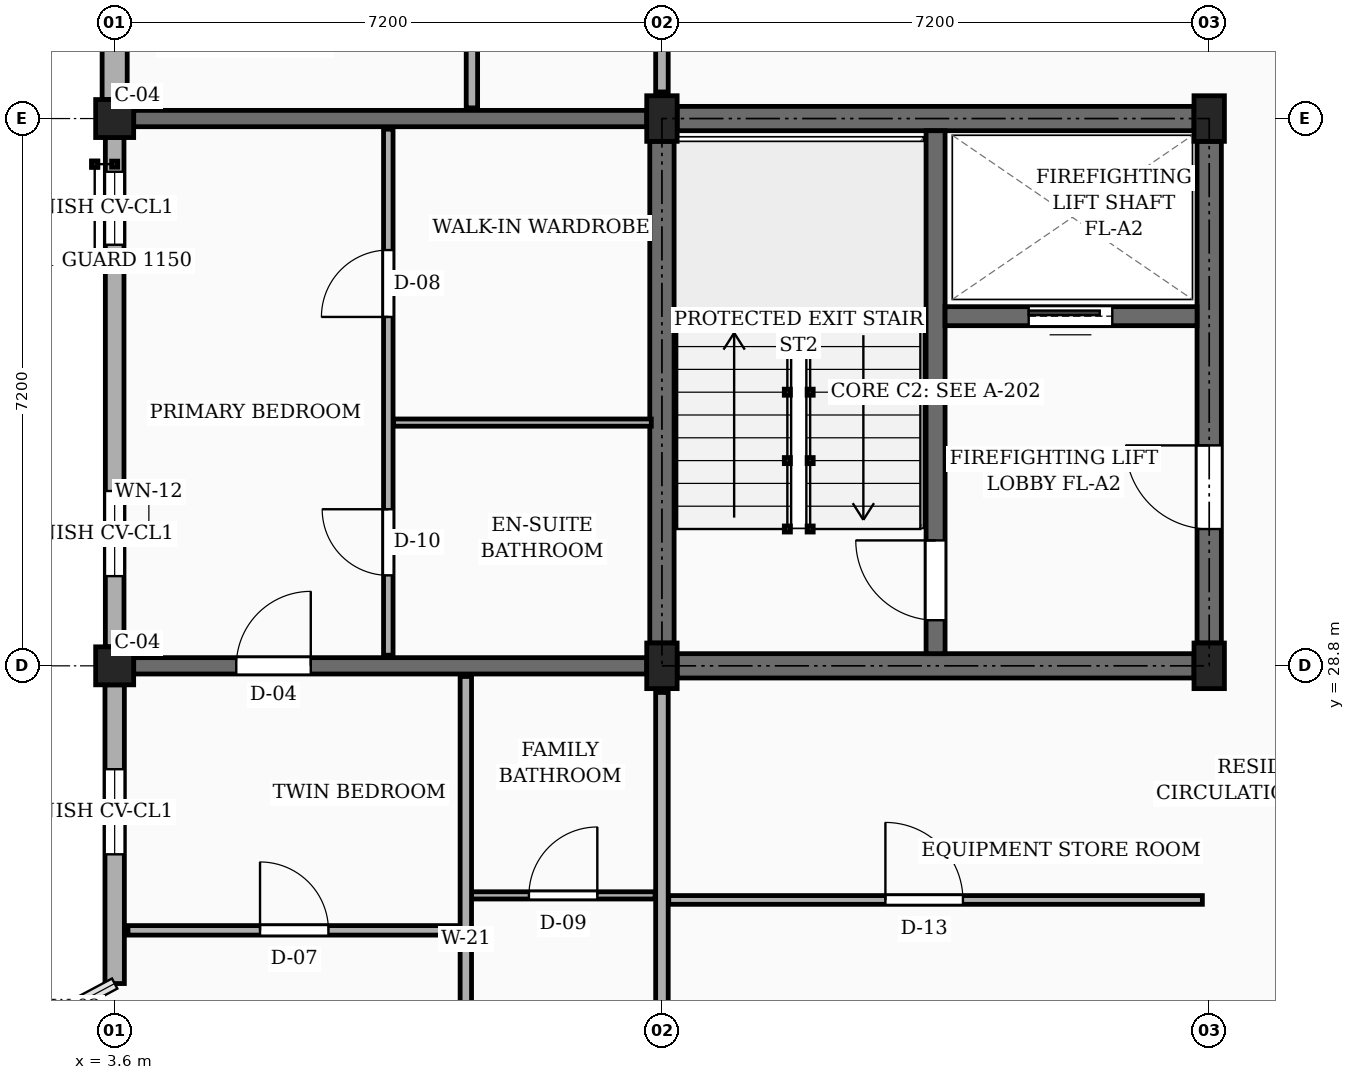
"""IFC4 building model, lengths in metres.
Left out: names, types, materials, properties, quantities, classifications, styles, units other than length and angle.
Written with IfcOpenShell. Run it as: python <this file> out.ifc"""

import sys

from ifc_helpers import new_model, si_unit, direction, frame, frame_2d, origin, origin_2d, place, context, subcontext, project, spatial, rectangle, extrude, element, fill, save


model = new_model("IFC4")
c1 = context("Model", 3, precision=1e-05, world=origin(), true_north=direction((0.0, 1.0)))
c2 = subcontext(c1, "Body", "Model", "MODEL_VIEW")
j1 = project(units=[si_unit("LENGTHUNIT", "METRE"), si_unit("PLANEANGLEUNIT", "RADIAN")], contexts=[c1])
p1 = place(None, origin())
s1 = spatial("IfcSite", under=j1, at=p1, CompositionType="ELEMENT")
p2 = place(p1, origin())
s2 = spatial("IfcBuilding", under=s1, at=p2, CompositionType="ELEMENT")
p3 = place(p2, frame((0.0, 0.0, 32.85)))
s3 = spatial("IfcBuildingStorey", under=s2, at=p3, CompositionType="ELEMENT", Elevation=32.85)
for number, where, z_axis, x_axis in (
    (1, (3.6, 28.8, 0.0), (0.0, 0.0, 1.0), (1.0, 0.0, 0.0)),
    (2, (3.6, 36.0, 0.0), (0.0, 0.0, 1.0), (1.0, 0.0, 0.0)),
):
    element("IfcColumn", number, at=place(p3, frame(where, z_axis=z_axis, x_axis=x_axis)), inside=s3, PredefinedType="COLUMN", context=c2, shape_type="SweptSolid", body=[
        extrude(rectangle(XDim=0.5, YDim=0.5, at=origin_2d()), origin(), (0.0, 0.0, 1.0), 3.15),
    ])
for number, where, z_axis, x_axis in (
    (3, (10.8, 28.8, 0.0), (0.0, 0.0, 1.0), (1.0, 0.0, 0.0)),
    (4, (10.8, 36.0, 0.0), (0.0, 0.0, 1.0), (1.0, 0.0, 0.0)),
    (5, (18.0, 28.8, 0.0), (0.0, 0.0, 1.0), (1.0, 0.0, 0.0)),
    (6, (18.0, 36.0, 0.0), (0.0, 0.0, 1.0), (1.0, 0.0, 0.0)),
):
    element("IfcColumn", number, at=place(p3, frame(where, z_axis=z_axis, x_axis=x_axis)), inside=s3, PredefinedType="COLUMN", context=c2, shape_type="SweptSolid", body=[
        extrude(rectangle(XDim=0.4, YDim=0.6, at=origin_2d()), origin(), (0.0, 0.0, 1.0), 3.15),
    ])
p4 = place(p3, frame((3.85, 28.8, 0.0), z_axis=(0.0, 0.0, 1.0), x_axis=(1.0, 0.0, 0.0)))
e7 = element("IfcWall", 7, at=p4, inside=s3, PredefinedType="SOLIDWALL", context=c2, shape_type="SweptSolid", body=[
    extrude(rectangle(XDim=6.75, YDim=0.215, at=frame_2d((3.375, 0.0))), origin(), (0.0, 0.0, 1.0), 2.17),
])
p5 = place(p4, frame((1.35, 0.0, 0.0)))
e8 = element("IfcOpeningElement", 8, at=p5, cuts=e7, PredefinedType="OPENING", context=c2, shape_type="SweptSolid", body=[
    extrude(rectangle(XDim=0.98, YDim=2.12, at=frame_2d((0.49, 1.06))), frame((0.0, 0.118, 0.0), z_axis=(0.0, -1.0, 0.0), x_axis=(1.0, 0.0, 0.0)), (0.0, 0.0, 1.0), 0.235),
])
p6 = place(p3, frame((3.85, 36.0, 0.0), z_axis=(0.0, 0.0, 1.0), x_axis=(1.0, 0.0, 0.0)))
e9 = element("IfcWall", 9, at=p6, inside=s3, PredefinedType="SOLIDWALL", context=c2, shape_type="SweptSolid", body=[
    extrude(rectangle(XDim=6.75, YDim=0.215, at=frame_2d((3.375, 0.0))), origin(), (0.0, 0.0, 1.0), 2.17),
])
p7 = place(p3, frame((3.6, 42.95, 0.0), z_axis=(0.0, 0.0, 1.0), x_axis=(0.0, -1.0, 0.0)))
e10 = element("IfcWall", 10, at=p7, inside=s3, PredefinedType="SOLIDWALL", context=c2, shape_type="SweptSolid", body=[
    extrude(rectangle(XDim=6.7, YDim=0.33, at=frame_2d((3.35, 0.0))), origin(), (0.0, 0.0, 1.0), 2.44),
])
p8 = place(p7, frame((0.45, 0.0, 0.78)))
e11 = element("IfcOpeningElement", 11, at=p8, cuts=e10, PredefinedType="OPENING", context=c2, shape_type="SweptSolid", body=[
    extrude(rectangle(XDim=1.4, YDim=1.15, at=frame_2d((0.7, 0.575))), frame((0.0, 0.175, 0.0), z_axis=(0.0, -1.0, 0.0), x_axis=(1.0, 0.0, 0.0)), (0.0, 0.0, 1.0), 0.35),
])
p9 = place(p7, frame((4.65, 0.0, 0.78)))
e12 = element("IfcOpeningElement", 12, at=p9, cuts=e10, PredefinedType="OPENING", context=c2, shape_type="SweptSolid", body=[
    extrude(rectangle(XDim=0.96, YDim=1.26, at=frame_2d((0.48, 0.63))), frame((0.0, 0.175, 0.0), z_axis=(0.0, -1.0, 0.0), x_axis=(1.0, 0.0, 0.0)), (0.0, 0.0, 1.0), 0.35),
])
p10 = place(p3, frame((3.6, 35.75, 0.0), z_axis=(0.0, 0.0, 1.0), x_axis=(0.0, -1.0, 0.0)))
e13 = element("IfcWall", 13, at=p10, inside=s3, PredefinedType="SOLIDWALL", context=c2, shape_type="SweptSolid", body=[
    extrude(rectangle(XDim=6.7, YDim=0.245, at=frame_2d((3.35, 0.0))), origin(), (0.0, 0.0, 1.0), 2.44),
])
p11 = place(p10, frame((0.45, 0.0, 0.78)))
e14 = element("IfcOpeningElement", 14, at=p11, cuts=e13, PredefinedType="OPENING", context=c2, shape_type="SweptSolid", body=[
    extrude(rectangle(XDim=0.96, YDim=1.26, at=frame_2d((0.48, 0.63))), frame((0.0, 0.133, 0.0), z_axis=(0.0, -1.0, 0.0), x_axis=(1.0, 0.0, 0.0)), (0.0, 0.0, 1.0), 0.265),
])
p12 = place(p10, frame((4.65, 0.0, 0.78)))
e15 = element("IfcOpeningElement", 15, at=p12, cuts=e13, PredefinedType="OPENING", context=c2, shape_type="SweptSolid", body=[
    extrude(rectangle(XDim=1.12, YDim=1.26, at=frame_2d((0.56, 0.63))), frame((0.0, 0.133, 0.0), z_axis=(0.0, -1.0, 0.0), x_axis=(1.0, 0.0, 0.0)), (0.0, 0.0, 1.0), 0.265),
])
p13 = place(p3, frame((3.6, 28.55, 0.0), z_axis=(0.0, 0.0, 1.0), x_axis=(0.0, -1.0, 0.0)))
e16 = element("IfcWall", 16, at=p13, inside=s3, PredefinedType="SOLIDWALL", context=c2, shape_type="SweptSolid", body=[
    extrude(rectangle(XDim=3.93, YDim=0.255, at=frame_2d((1.965, 0.0))), origin(), (0.0, 0.0, 1.0), 2.44),
])
p14 = place(p13, frame((1.11, 0.0, 0.78)))
e17 = element("IfcOpeningElement", 17, at=p14, cuts=e16, PredefinedType="OPENING", context=c2, shape_type="SweptSolid", body=[
    extrude(rectangle(XDim=1.12, YDim=1.26, at=frame_2d((0.56, 0.63))), frame((0.0, 0.137, 0.0), z_axis=(0.0, -1.0, 0.0), x_axis=(1.0, 0.0, 0.0)), (0.0, 0.0, 1.0), 0.275),
])
p15 = place(p3, frame((10.8, 29.1, 0.0), z_axis=(0.0, 0.0, 1.0), x_axis=(0.0, 1.0, 0.0)))
e18 = element("IfcWall", 18, at=p15, inside=s3, PredefinedType="SHEAR", context=c2, shape_type="SweptSolid", body=[
    extrude(rectangle(XDim=6.6, YDim=0.32, at=frame_2d((3.3, 0.0))), origin(), (0.0, 0.0, 1.0), 2.87),
])
p16 = place(p3, frame((11.0, 36.0, 0.0), z_axis=(0.0, 0.0, 1.0), x_axis=(1.0, 0.0, 0.0)))
e19 = element("IfcWall", 19, at=p16, inside=s3, PredefinedType="SHEAR", context=c2, shape_type="SweptSolid", body=[
    extrude(rectangle(XDim=6.8, YDim=0.32, at=frame_2d((3.4, 0.0))), origin(), (0.0, 0.0, 1.0), 2.87),
])
p17 = place(p3, frame((18.0, 29.1, 0.0), z_axis=(0.0, 0.0, 1.0), x_axis=(0.0, 1.0, 0.0)))
e20 = element("IfcWall", 20, at=p17, inside=s3, PredefinedType="SHEAR", context=c2, shape_type="SweptSolid", body=[
    extrude(rectangle(XDim=6.6, YDim=0.32, at=frame_2d((3.3, 0.0))), origin(), (0.0, 0.0, 1.0), 2.87),
])
p18 = place(p17, frame((1.5, 0.0, 0.0)))
e21 = element("IfcOpeningElement", 21, at=p18, cuts=e20, PredefinedType="OPENING", context=c2, shape_type="SweptSolid", body=[
    extrude(rectangle(XDim=1.1, YDim=2.15, at=frame_2d((0.55, 1.075))), frame((0.0, 0.17, 0.0), z_axis=(0.0, -1.0, 0.0), x_axis=(1.0, 0.0, 0.0)), (0.0, 0.0, 1.0), 0.34),
])
p19 = place(p3, frame((11.0, 28.8, 0.0), z_axis=(0.0, 0.0, 1.0), x_axis=(1.0, 0.0, 0.0)))
e22 = element("IfcWall", 22, at=p19, inside=s3, PredefinedType="SHEAR", context=c2, shape_type="SweptSolid", body=[
    extrude(rectangle(XDim=6.8, YDim=0.32, at=frame_2d((3.4, 0.0))), origin(), (0.0, 0.0, 1.0), 2.87),
])
p20 = place(p3, frame((14.4, 28.96, 0.0), z_axis=(0.0, 0.0, 1.0), x_axis=(0.0, 1.0, 0.0)))
e23 = element("IfcWall", 23, at=p20, inside=s3, PredefinedType="SHEAR", context=c2, shape_type="SweptSolid", body=[
    extrude(rectangle(XDim=6.88, YDim=0.25, at=frame_2d((3.44, 0.0))), origin(), (0.0, 0.0, 1.0), 2.87),
])
p21 = place(p20, frame((0.44, 0.0, 0.0)))
e24 = element("IfcOpeningElement", 24, at=p21, cuts=e23, PredefinedType="OPENING", context=c2, shape_type="SweptSolid", body=[
    extrude(rectangle(XDim=1.05, YDim=2.15, at=frame_2d((0.525, 1.075))), frame((0.0, 0.135, 0.0), z_axis=(0.0, -1.0, 0.0), x_axis=(1.0, 0.0, 0.0)), (0.0, 0.0, 1.0), 0.27),
])
p22 = place(p3, frame((14.525, 33.4, 0.0), z_axis=(0.0, 0.0, 1.0), x_axis=(1.0, 0.0, 0.0)))
e25 = element("IfcWall", 25, at=p22, inside=s3, PredefinedType="SHEAR", context=c2, shape_type="SweptSolid", body=[
    extrude(rectangle(XDim=3.315, YDim=0.25, at=frame_2d((1.658, 0.0))), origin(), (0.0, 0.0, 1.0), 2.87),
])
p23 = place(p22, frame((1.1, 0.0, 0.0)))
e26 = element("IfcOpeningElement", 26, at=p23, cuts=e25, PredefinedType="OPENING", context=c2, shape_type="SweptSolid", body=[
    extrude(rectangle(XDim=1.1, YDim=2.2, at=frame_2d((0.55, 1.1))), frame((0.0, 0.135, 0.0), z_axis=(0.0, -1.0, 0.0), x_axis=(1.0, 0.0, 0.0)), (0.0, 0.0, 1.0), 0.27),
])
p24 = place(p3, frame((10.8, 21.95, 0.0), z_axis=(0.0, 0.0, 1.0), x_axis=(0.0, 1.0, 0.0)))
e27 = element("IfcWall", 27, at=p24, inside=s3, PredefinedType="PARTITIONING", context=c2, shape_type="SweptSolid", body=[
    extrude(rectangle(XDim=6.5, YDim=0.165, at=frame_2d((3.25, 0.0))), origin(), (0.0, 0.0, 1.0), 2.305),
])
p25 = place(p24, frame((1.0, 0.0, 0.0)))
e28 = element("IfcOpeningElement", 28, at=p25, cuts=e27, PredefinedType="OPENING", context=c2, shape_type="SweptSolid", body=[
    extrude(rectangle(XDim=1.14, YDim=2.18, at=frame_2d((0.57, 1.09))), frame((0.0, 0.093, 0.0), z_axis=(0.0, -1.0, 0.0), x_axis=(1.0, 0.0, 0.0)), (0.0, 0.0, 1.0), 0.185),
])
p26 = place(p3, frame((10.8, 36.35, 0.0), z_axis=(0.0, 0.0, 1.0), x_axis=(0.0, 1.0, 0.0)))
e29 = element("IfcWall", 29, at=p26, inside=s3, PredefinedType="PARTITIONING", context=c2, shape_type="SweptSolid", body=[
    extrude(rectangle(XDim=6.5, YDim=0.165, at=frame_2d((3.25, 0.0))), origin(), (0.0, 0.0, 1.0), 2.305),
])
p27 = place(p26, frame((1.0, 0.0, 0.0)))
e30 = element("IfcOpeningElement", 30, at=p27, cuts=e29, PredefinedType="OPENING", context=c2, shape_type="SweptSolid", body=[
    extrude(rectangle(XDim=1.0, YDim=2.15, at=frame_2d((0.5, 1.075))), frame((0.0, 0.093, 0.0), z_axis=(0.0, -1.0, 0.0), x_axis=(1.0, 0.0, 0.0)), (0.0, 0.0, 1.0), 0.185),
])
p28 = place(p3, frame((10.89, 25.72, 0.0), z_axis=(0.0, 0.0, 1.0), x_axis=(1.0, 0.0, 0.0)))
e31 = element("IfcWall", 31, at=p28, inside=s3, PredefinedType="PARTITIONING", context=c2, shape_type="SweptSolid", body=[
    extrude(rectangle(XDim=7.02, YDim=0.115, at=frame_2d((3.51, 0.0))), origin(), (0.0, 0.0, 1.0), 2.305),
])
p29 = place(p28, frame((2.85, 0.0, 0.0)))
e32 = element("IfcOpeningElement", 32, at=p29, cuts=e31, PredefinedType="OPENING", context=c2, shape_type="SweptSolid", body=[
    extrude(rectangle(XDim=1.02, YDim=2.15, at=frame_2d((0.51, 1.075))), frame((0.0, 0.067, 0.0), z_axis=(0.0, -1.0, 0.0), x_axis=(1.0, 0.0, 0.0)), (0.0, 0.0, 1.0), 0.135),
])
p30 = place(p3, frame((3.775, 25.32, 0.0), z_axis=(0.0, 0.0, 1.0), x_axis=(1.0, 0.0, 0.0)))
e33 = element("IfcWall", 33, at=p30, inside=s3, PredefinedType="PARTITIONING", context=c2, shape_type="SweptSolid", body=[
    extrude(rectangle(XDim=4.375, YDim=0.125, at=frame_2d((2.188, 0.0))), origin(), (0.0, 0.0, 1.0), 2.305),
])
p31 = place(p30, frame((1.738, 0.0, 0.0)))
e34 = element("IfcOpeningElement", 34, at=p31, cuts=e33, PredefinedType="OPENING", context=c2, shape_type="SweptSolid", body=[
    extrude(rectangle(XDim=0.9, YDim=2.1, at=frame_2d((0.45, 1.05))), frame((0.0, 0.073, 0.0), z_axis=(0.0, -1.0, 0.0), x_axis=(1.0, 0.0, 0.0)), (0.0, 0.0, 1.0), 0.145),
])
p32 = place(p3, frame((8.29, 25.78, 0.0), z_axis=(0.0, 0.0, 1.0), x_axis=(1.0, 0.0, 0.0)))
e35 = element("IfcWall", 35, at=p32, inside=s3, PredefinedType="PARTITIONING", context=c2, shape_type="SweptSolid", body=[
    extrude(rectangle(XDim=2.42, YDim=0.095, at=frame_2d((1.21, 0.0))), origin(), (0.0, 0.0, 1.0), 2.305),
])
p33 = place(p32, frame((0.76, 0.0, 0.0)))
e36 = element("IfcOpeningElement", 36, at=p33, cuts=e35, PredefinedType="OPENING", context=c2, shape_type="SweptSolid", body=[
    extrude(rectangle(XDim=0.9, YDim=2.05, at=frame_2d((0.45, 1.025))), frame((0.0, 0.058, 0.0), z_axis=(0.0, -1.0, 0.0), x_axis=(1.0, 0.0, 0.0)), (0.0, 0.0, 1.0), 0.115),
])
p34 = place(p3, frame((8.22, 21.74, 0.0), z_axis=(0.0, 0.0, 1.0), x_axis=(0.0, 1.0, 0.0)))
e37 = element("IfcWall", 37, at=p34, inside=s3, PredefinedType="PARTITIONING", context=c2, shape_type="SweptSolid", body=[
    extrude(rectangle(XDim=6.92, YDim=0.15, at=frame_2d((3.46, 0.0))), origin(), (0.0, 0.0, 1.0), 2.305),
])
p35 = place(p34, frame((1.31, 0.0, 0.0)))
e38 = element("IfcOpeningElement", 38, at=p35, cuts=e37, PredefinedType="OPENING", context=c2, shape_type="SweptSolid", body=[
    extrude(rectangle(XDim=0.95, YDim=2.1, at=frame_2d((0.475, 1.05))), frame((0.0, 0.085, 0.0), z_axis=(0.0, -1.0, 0.0), x_axis=(1.0, 0.0, 0.0)), (0.0, 0.0, 1.0), 0.17),
])
p36 = place(p3, frame((7.2, 28.94, 0.0), z_axis=(0.0, 0.0, 1.0), x_axis=(0.0, 1.0, 0.0)))
e39 = element("IfcWall", 39, at=p36, inside=s3, PredefinedType="PARTITIONING", context=c2, shape_type="SweptSolid", body=[
    extrude(rectangle(XDim=6.92, YDim=0.125, at=frame_2d((3.46, 0.0))), origin(), (0.0, 0.0, 1.0), 2.305),
])
p37 = place(p36, frame((1.05, 0.0, 0.0)))
e40 = element("IfcOpeningElement", 40, at=p37, cuts=e39, PredefinedType="OPENING", context=c2, shape_type="SweptSolid", body=[
    extrude(rectangle(XDim=0.87, YDim=2.05, at=frame_2d((0.435, 1.025))), frame((0.0, 0.073, 0.0), z_axis=(0.0, -1.0, 0.0), x_axis=(1.0, 0.0, 0.0)), (0.0, 0.0, 1.0), 0.145),
])
p38 = place(p36, frame((4.45, 0.0, 0.0)))
e41 = element("IfcOpeningElement", 41, at=p38, cuts=e39, PredefinedType="OPENING", context=c2, shape_type="SweptSolid", body=[
    extrude(rectangle(XDim=0.88, YDim=2.08, at=frame_2d((0.44, 1.04))), frame((0.0, 0.073, 0.0), z_axis=(0.0, -1.0, 0.0), x_axis=(1.0, 0.0, 0.0)), (0.0, 0.0, 1.0), 0.145),
])
p39 = place(p3, frame((7.27, 32.0, 0.0), z_axis=(0.0, 0.0, 1.0), x_axis=(1.0, 0.0, 0.0)))
e42 = element("IfcWall", 42, at=p39, inside=s3, PredefinedType="PARTITIONING", context=c2, shape_type="SweptSolid", body=[
    extrude(rectangle(XDim=3.39, YDim=0.095, at=frame_2d((1.695, 0.0))), origin(), (0.0, 0.0, 1.0), 2.305),
])
p40 = place(p3, frame((8.3, 36.14, 0.0), z_axis=(0.0, 0.0, 1.0), x_axis=(0.0, 1.0, 0.0)))
e43 = element("IfcWall", 43, at=p40, inside=s3, PredefinedType="PARTITIONING", context=c2, shape_type="SweptSolid", body=[
    extrude(rectangle(XDim=6.885, YDim=0.15, at=frame_2d((3.442, 0.0))), origin(), (0.0, 0.0, 1.0), 2.305),
])
p41 = place(p40, frame((1.31, 0.0, 0.0)))
e44 = element("IfcOpeningElement", 44, at=p41, cuts=e43, PredefinedType="OPENING", context=c2, shape_type="SweptSolid", body=[
    extrude(rectangle(XDim=0.95, YDim=2.1, at=frame_2d((0.475, 1.05))), frame((0.0, 0.085, 0.0), z_axis=(0.0, -1.0, 0.0), x_axis=(1.0, 0.0, 0.0)), (0.0, 0.0, 1.0), 0.17),
])
p42 = place(p11, origin())
e45 = element("IfcWindow", 45, at=p42, inside=s3, PartitioningType="SINGLE_PANEL", PredefinedType="WINDOW", context=c2, shape_type="SweptSolid", body=[
    extrude(rectangle(XDim=0.96, YDim=1.26, at=frame_2d((0.48, 0.63))), frame((0.0, 0.03, 0.0), z_axis=(0.0, -1.0, 0.0), x_axis=(1.0, 0.0, 0.0)), (0.0, 0.0, 1.0), 0.06),
])
fill(e14, e45)
p43 = place(p12, origin())
e46 = element("IfcWindow", 46, at=p43, inside=s3, PartitioningType="SINGLE_PANEL", PredefinedType="WINDOW", context=c2, shape_type="SweptSolid", body=[
    extrude(rectangle(XDim=1.12, YDim=1.26, at=frame_2d((0.56, 0.63))), frame((0.0, 0.03, 0.0), z_axis=(0.0, -1.0, 0.0), x_axis=(1.0, 0.0, 0.0)), (0.0, 0.0, 1.0), 0.06),
])
fill(e15, e46)
p44 = place(p14, origin())
e47 = element("IfcWindow", 47, at=p44, inside=s3, PartitioningType="SINGLE_PANEL", PredefinedType="WINDOW", context=c2, shape_type="SweptSolid", body=[
    extrude(rectangle(XDim=1.12, YDim=1.26, at=frame_2d((0.56, 0.63))), frame((0.0, 0.03, 0.0), z_axis=(0.0, -1.0, 0.0), x_axis=(1.0, 0.0, 0.0)), (0.0, 0.0, 1.0), 0.06),
])
fill(e17, e47)
p45 = place(p18, frame((1.1, 0.0, 0.0), z_axis=(0.0, 0.0, 1.0), x_axis=(-1.0, 0.0, 0.0)))
e48 = element("IfcDoor", 48, at=p45, inside=s3, OperationType="SINGLE_SWING_RIGHT", PredefinedType="DOOR", context=c2, shape_type="SweptSolid", body=[
    extrude(rectangle(XDim=1.1, YDim=2.15, at=frame_2d((0.55, 1.075))), frame((0.0, 0.025, 0.0), z_axis=(0.0, -1.0, 0.0), x_axis=(1.0, 0.0, 0.0)), (0.0, 0.0, 1.0), 0.05),
])
fill(e21, e48)
p46 = place(p21, origin())
e49 = element("IfcDoor", 49, at=p46, inside=s3, OperationType="SINGLE_SWING_RIGHT", PredefinedType="DOOR", context=c2, shape_type="SweptSolid", body=[
    extrude(rectangle(XDim=1.05, YDim=2.15, at=frame_2d((0.525, 1.075))), frame((0.0, 0.025, 0.0), z_axis=(0.0, -1.0, 0.0), x_axis=(1.0, 0.0, 0.0)), (0.0, 0.0, 1.0), 0.05),
])
fill(e24, e49)
p47 = place(p23, origin())
e50 = element("IfcDoor", 50, at=p47, inside=s3, OperationType="SLIDING_TO_LEFT", PredefinedType="DOOR", context=c2, shape_type="SweptSolid", body=[
    extrude(rectangle(XDim=1.1, YDim=2.2, at=frame_2d((0.55, 1.1))), frame((0.0, 0.025, 0.0), z_axis=(0.0, -1.0, 0.0), x_axis=(1.0, 0.0, 0.0)), (0.0, 0.0, 1.0), 0.05),
])
fill(e26, e50)
p48 = place(p29, origin())
e51 = element("IfcDoor", 51, at=p48, inside=s3, OperationType="SINGLE_SWING_LEFT", PredefinedType="DOOR", context=c2, shape_type="SweptSolid", body=[
    extrude(rectangle(XDim=1.02, YDim=2.15, at=frame_2d((0.51, 1.075))), frame((0.0, 0.025, 0.0), z_axis=(0.0, -1.0, 0.0), x_axis=(1.0, 0.0, 0.0)), (0.0, 0.0, 1.0), 0.05),
])
fill(e32, e51)
p49 = place(p31, origin())
e52 = element("IfcDoor", 52, at=p49, inside=s3, OperationType="SINGLE_SWING_LEFT", PredefinedType="DOOR", context=c2, shape_type="SweptSolid", body=[
    extrude(rectangle(XDim=0.9, YDim=2.1, at=frame_2d((0.45, 1.05))), frame((0.0, 0.025, 0.0), z_axis=(0.0, -1.0, 0.0), x_axis=(1.0, 0.0, 0.0)), (0.0, 0.0, 1.0), 0.05),
])
fill(e34, e52)
p50 = place(p33, origin())
e53 = element("IfcDoor", 53, at=p50, inside=s3, OperationType="SINGLE_SWING_RIGHT", PredefinedType="DOOR", context=c2, shape_type="SweptSolid", body=[
    extrude(rectangle(XDim=0.9, YDim=2.05, at=frame_2d((0.45, 1.025))), frame((0.0, 0.025, 0.0), z_axis=(0.0, -1.0, 0.0), x_axis=(1.0, 0.0, 0.0)), (0.0, 0.0, 1.0), 0.05),
])
fill(e36, e53)
p51 = place(p37, origin())
e54 = element("IfcDoor", 54, at=p51, inside=s3, OperationType="SINGLE_SWING_RIGHT", PredefinedType="DOOR", context=c2, shape_type="SweptSolid", body=[
    extrude(rectangle(XDim=0.87, YDim=2.05, at=frame_2d((0.435, 1.025))), frame((0.0, 0.025, 0.0), z_axis=(0.0, -1.0, 0.0), x_axis=(1.0, 0.0, 0.0)), (0.0, 0.0, 1.0), 0.05),
])
fill(e40, e54)
p52 = place(p38, origin())
e55 = element("IfcDoor", 55, at=p52, inside=s3, OperationType="SINGLE_SWING_LEFT", PredefinedType="DOOR", context=c2, shape_type="SweptSolid", body=[
    extrude(rectangle(XDim=0.88, YDim=2.08, at=frame_2d((0.44, 1.04))), frame((0.0, 0.025, 0.0), z_axis=(0.0, -1.0, 0.0), x_axis=(1.0, 0.0, 0.0)), (0.0, 0.0, 1.0), 0.05),
])
fill(e41, e55)
p53 = place(p5, origin())
e56 = element("IfcDoor", 56, at=p53, inside=s3, OperationType="SINGLE_SWING_RIGHT", PredefinedType="DOOR", context=c2, shape_type="SweptSolid", body=[
    extrude(rectangle(XDim=0.98, YDim=2.12, at=frame_2d((0.49, 1.06))), frame((0.0, 0.025, 0.0), z_axis=(0.0, -1.0, 0.0), x_axis=(1.0, 0.0, 0.0)), (0.0, 0.0, 1.0), 0.05),
])
fill(e8, e56)
save(model, sys.argv[1])
